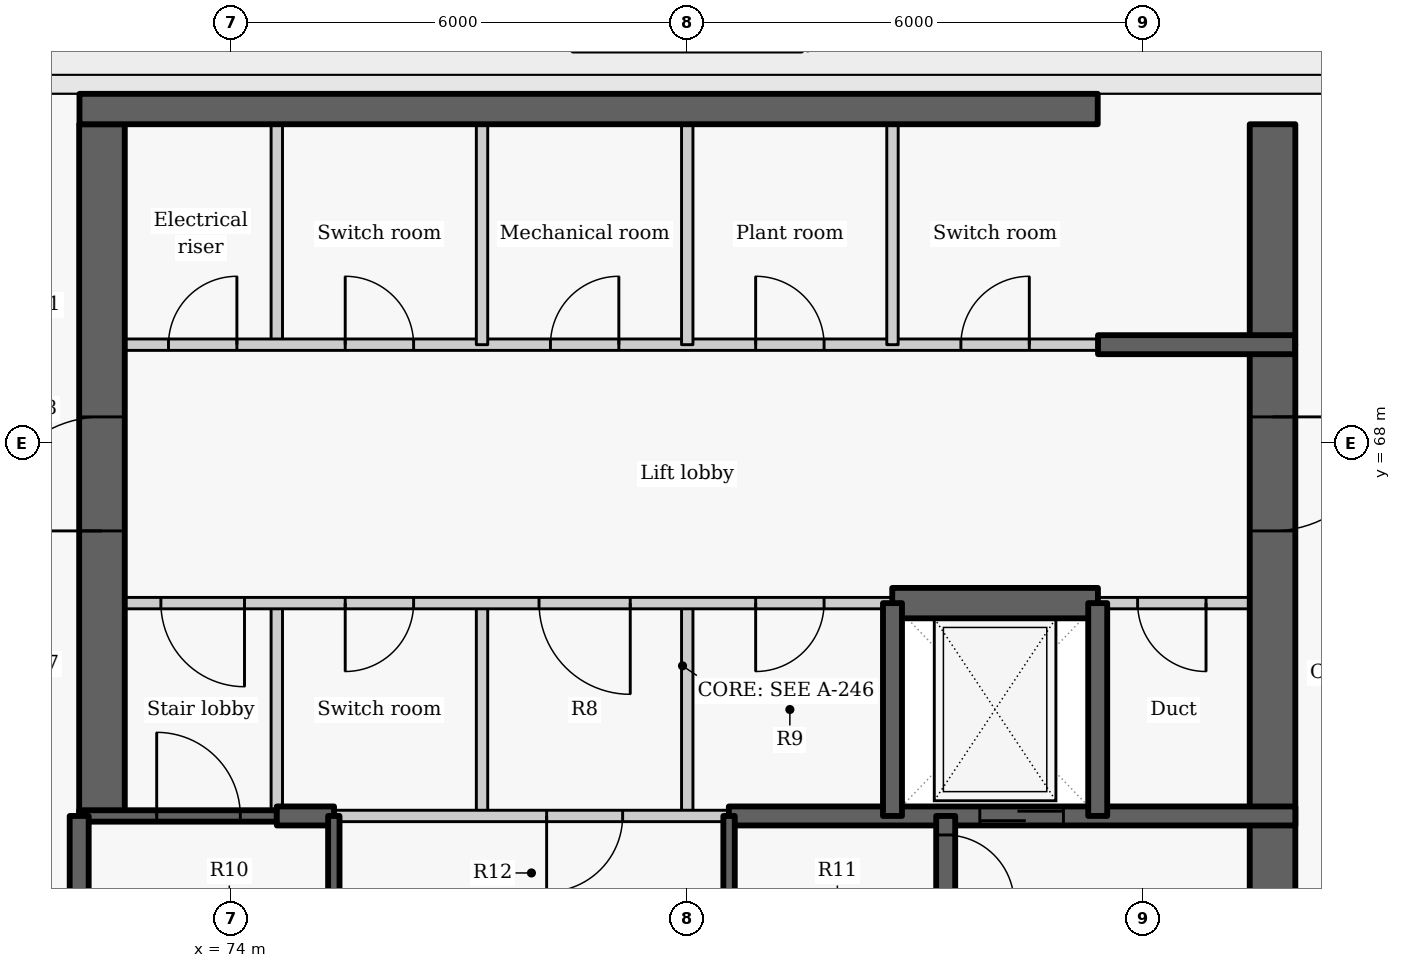
"""IFC4 building model, lengths in metres.
Left out: names, types, materials, properties, quantities, classifications, styles, units other than length and angle.
Written with IfcOpenShell. Run it as: python <this file> out.ifc"""

import sys

from ifc_helpers import new_model, si_unit, direction, frame, frame_2d, origin, place, context, subcontext, project, spatial, rectangle, extrude, element, fill, save


model = new_model("IFC4")
c1 = context("Model", 3, precision=1e-05, world=origin(), true_north=direction((0.0, 1.0)))
c2 = subcontext(c1, "Body", "Model", "MODEL_VIEW")
j1 = project(units=[si_unit("LENGTHUNIT", "METRE"), si_unit("PLANEANGLEUNIT", "RADIAN")], contexts=[c1])
p1 = place(None, origin())
s1 = spatial("IfcSite", under=j1, at=p1, CompositionType="ELEMENT")
p2 = place(p1, origin())
s2 = spatial("IfcBuilding", under=s1, at=p2, CompositionType="ELEMENT")
p3 = place(p2, frame((0.0, 0.0, 276.0)))
s3 = spatial("IfcBuildingStorey", under=s2, at=p3, CompositionType="ELEMENT", Elevation=276.0)
p4 = place(p3, frame((74.6, 63.1, 0.0), z_axis=(0.0, 0.0, 1.0), x_axis=(0.0, 1.0, 0.0)))
e1 = element("IfcWall", 1, at=p4, inside=s3, PredefinedType="PARTITIONING", context=c2, shape_type="SweptSolid", body=[
    extrude(rectangle(XDim=2.8, YDim=0.15, at=frame_2d((1.4, 0.0))), origin(), (0.0, 0.0, 1.0), 3.325),
])
p5 = place(p3, frame((74.6, 69.3, 0.0), z_axis=(0.0, 0.0, 1.0), x_axis=(0.0, 1.0, 0.0)))
e2 = element("IfcWall", 2, at=p5, inside=s3, PredefinedType="PARTITIONING", context=c2, shape_type="SweptSolid", body=[
    extrude(rectangle(XDim=2.9, YDim=0.15, at=frame_2d((1.45, 0.0))), origin(), (0.0, 0.0, 1.0), 3.325),
])
p6 = place(p3, frame((72.0, 69.3, 0.0), z_axis=(0.0, 0.0, 1.0), x_axis=(1.0, 0.0, 0.0)))
e3 = element("IfcWall", 3, at=p6, inside=s3, PredefinedType="PARTITIONING", context=c2, shape_type="SweptSolid", body=[
    extrude(rectangle(XDim=13.4, YDim=0.15, at=frame_2d((6.7, 0.0))), origin(), (0.0, 0.0, 1.0), 3.325),
])
p7 = place(p6, frame((1.175, 0.0, 0.0)))
e4 = element("IfcOpeningElement", 4, at=p7, cuts=e3, PredefinedType="OPENING", context=c2, shape_type="SweptSolid", body=[
    extrude(rectangle(XDim=0.9, YDim=2.1, at=frame_2d((0.45, 1.05))), frame((0.0, 0.085, 0.0), z_axis=(0.0, -1.0, 0.0), x_axis=(1.0, 0.0, 0.0)), (0.0, 0.0, 1.0), 0.17),
])
p8 = place(p6, frame((3.5, 0.0, 0.0)))
e5 = element("IfcOpeningElement", 5, at=p8, cuts=e3, PredefinedType="OPENING", context=c2, shape_type="SweptSolid", body=[
    extrude(rectangle(XDim=0.9, YDim=2.1, at=frame_2d((0.45, 1.05))), frame((0.0, 0.085, 0.0), z_axis=(0.0, -1.0, 0.0), x_axis=(1.0, 0.0, 0.0)), (0.0, 0.0, 1.0), 0.17),
])
p9 = place(p6, frame((6.2, 0.0, 0.0)))
e6 = element("IfcOpeningElement", 6, at=p9, cuts=e3, PredefinedType="OPENING", context=c2, shape_type="SweptSolid", body=[
    extrude(rectangle(XDim=0.9, YDim=2.1, at=frame_2d((0.45, 1.05))), frame((0.0, 0.085, 0.0), z_axis=(0.0, -1.0, 0.0), x_axis=(1.0, 0.0, 0.0)), (0.0, 0.0, 1.0), 0.17),
])
p10 = place(p6, frame((8.9, 0.0, 0.0)))
e7 = element("IfcOpeningElement", 7, at=p10, cuts=e3, PredefinedType="OPENING", context=c2, shape_type="SweptSolid", body=[
    extrude(rectangle(XDim=0.9, YDim=2.1, at=frame_2d((0.45, 1.05))), frame((0.0, 0.085, 0.0), z_axis=(0.0, -1.0, 0.0), x_axis=(1.0, 0.0, 0.0)), (0.0, 0.0, 1.0), 0.17),
])
p11 = place(p6, frame((11.6, 0.0, 0.0)))
e8 = element("IfcOpeningElement", 8, at=p11, cuts=e3, PredefinedType="OPENING", context=c2, shape_type="SweptSolid", body=[
    extrude(rectangle(XDim=0.9, YDim=2.1, at=frame_2d((0.45, 1.05))), frame((0.0, 0.085, 0.0), z_axis=(0.0, -1.0, 0.0), x_axis=(1.0, 0.0, 0.0)), (0.0, 0.0, 1.0), 0.17),
])
p12 = place(p3, frame((72.3, 63.1, -0.275), z_axis=(0.0, 0.0, 1.0), x_axis=(0.0, 1.0, 0.0)))
e9 = element("IfcWall", 9, at=p12, inside=s3, PredefinedType="SHEAR", context=c2, shape_type="SweptSolid", body=[
    extrude(rectangle(XDim=9.1, YDim=0.6, at=frame_2d((4.55, 0.0))), origin(), (0.0, 0.0, 1.0), 3.6),
])
p13 = place(p12, frame((3.75, 0.0, 0.275)))
e10 = element("IfcOpeningElement", 10, at=p13, cuts=e9, PredefinedType="OPENING", context=c2, shape_type="SweptSolid", body=[
    extrude(rectangle(XDim=1.5, YDim=2.1, at=frame_2d((0.75, 1.05))), frame((0.0, 0.31, 0.0), z_axis=(0.0, -1.0, 0.0), x_axis=(1.0, 0.0, 0.0)), (0.0, 0.0, 1.0), 0.62),
])
p14 = place(p3, frame((77.3, 63.1, 0.0), z_axis=(0.0, 0.0, 1.0), x_axis=(0.0, 1.0, 0.0)))
e11 = element("IfcWall", 11, at=p14, inside=s3, PredefinedType="PARTITIONING", context=c2, shape_type="SweptSolid", body=[
    extrude(rectangle(XDim=2.8, YDim=0.15, at=frame_2d((1.4, 0.0))), origin(), (0.0, 0.0, 1.0), 3.325),
])
p15 = place(p3, frame((77.3, 69.3, 0.0), z_axis=(0.0, 0.0, 1.0), x_axis=(0.0, 1.0, 0.0)))
e12 = element("IfcWall", 12, at=p15, inside=s3, PredefinedType="PARTITIONING", context=c2, shape_type="SweptSolid", body=[
    extrude(rectangle(XDim=2.9, YDim=0.15, at=frame_2d((1.45, 0.0))), origin(), (0.0, 0.0, 1.0), 3.325),
])
p16 = place(p3, frame((80.0, 63.1, 0.0), z_axis=(0.0, 0.0, 1.0), x_axis=(0.0, 1.0, 0.0)))
e13 = element("IfcWall", 13, at=p16, inside=s3, PredefinedType="PARTITIONING", context=c2, shape_type="SweptSolid", body=[
    extrude(rectangle(XDim=2.8, YDim=0.15, at=frame_2d((1.4, 0.0))), origin(), (0.0, 0.0, 1.0), 3.325),
])
for number, where, z_axis, x_axis in (
    (14, (80.0, 69.3, 0.0), (0.0, 0.0, 1.0), (0.0, 1.0, 0.0)),
    (15, (82.7, 69.3, 0.0), (0.0, 0.0, 1.0), (0.0, 1.0, 0.0)),
):
    element("IfcWall", number, at=place(p3, frame(where, z_axis=z_axis, x_axis=x_axis)), inside=s3, PredefinedType="PARTITIONING", context=c2, shape_type="SweptSolid", body=[
        extrude(rectangle(XDim=2.9, YDim=0.15, at=frame_2d((1.45, 0.0))), origin(), (0.0, 0.0, 1.0), 3.325),
    ])
p17 = place(p3, frame((82.703, 65.9, 0.0), z_axis=(0.0, 0.0, 1.0), x_axis=(-1.0, 0.0, 0.0)))
e16 = element("IfcWall", 16, at=p17, inside=s3, PredefinedType="PARTITIONING", context=c2, shape_type="SweptSolid", body=[
    extrude(rectangle(XDim=10.703, YDim=0.15, at=frame_2d((5.352, 0.0))), origin(), (0.0, 0.0, 1.0), 3.325),
])
p18 = place(p17, frame((8.528, 0.0, 0.0)))
e17 = element("IfcOpeningElement", 17, at=p18, cuts=e16, PredefinedType="OPENING", context=c2, shape_type="SweptSolid", body=[
    extrude(rectangle(XDim=1.1, YDim=2.1, at=frame_2d((0.55, 1.05))), frame((0.0, 0.085, 0.0), z_axis=(0.0, -1.0, 0.0), x_axis=(1.0, 0.0, 0.0)), (0.0, 0.0, 1.0), 0.17),
])
p19 = place(p17, frame((6.303, 0.0, 0.0)))
e18 = element("IfcOpeningElement", 18, at=p19, cuts=e16, PredefinedType="OPENING", context=c2, shape_type="SweptSolid", body=[
    extrude(rectangle(XDim=0.9, YDim=2.1, at=frame_2d((0.45, 1.05))), frame((0.0, 0.085, 0.0), z_axis=(0.0, -1.0, 0.0), x_axis=(1.0, 0.0, 0.0)), (0.0, 0.0, 1.0), 0.17),
])
p20 = place(p17, frame((3.453, 0.0, 0.0)))
e19 = element("IfcOpeningElement", 19, at=p20, cuts=e16, PredefinedType="OPENING", context=c2, shape_type="SweptSolid", body=[
    extrude(rectangle(XDim=1.2, YDim=2.1, at=frame_2d((0.6, 1.05))), frame((0.0, 0.085, 0.0), z_axis=(0.0, -1.0, 0.0), x_axis=(1.0, 0.0, 0.0)), (0.0, 0.0, 1.0), 0.17),
])
p21 = place(p17, frame((0.903, 0.0, 0.0)))
e20 = element("IfcOpeningElement", 20, at=p21, cuts=e16, PredefinedType="OPENING", context=c2, shape_type="SweptSolid", body=[
    extrude(rectangle(XDim=0.9, YDim=2.1, at=frame_2d((0.45, 1.05))), frame((0.0, 0.085, 0.0), z_axis=(0.0, -1.0, 0.0), x_axis=(1.0, 0.0, 0.0)), (0.0, 0.0, 1.0), 0.17),
])
p22 = place(p3, frame((88.0, 65.9, 0.0), z_axis=(0.0, 0.0, 1.0), x_axis=(-1.0, 0.0, 0.0)))
e21 = element("IfcWall", 21, at=p22, inside=s3, PredefinedType="PARTITIONING", context=c2, shape_type="SweptSolid", body=[
    extrude(rectangle(XDim=2.603, YDim=0.15, at=frame_2d((1.302, 0.0))), origin(), (0.0, 0.0, 1.0), 3.325),
])
p23 = place(p22, frame((1.175, 0.0, 0.0)))
e22 = element("IfcOpeningElement", 22, at=p23, cuts=e21, PredefinedType="OPENING", context=c2, shape_type="SweptSolid", body=[
    extrude(rectangle(XDim=0.9, YDim=2.1, at=frame_2d((0.45, 1.05))), frame((0.0, 0.085, 0.0), z_axis=(0.0, -1.0, 0.0), x_axis=(1.0, 0.0, 0.0)), (0.0, 0.0, 1.0), 0.17),
])
p24 = place(p3, frame((82.697, 65.9, -0.275), z_axis=(0.0, 0.0, 1.0), x_axis=(1.0, 0.0, 0.0)))
e23 = element("IfcWall", 23, at=p24, inside=s3, PredefinedType="SHEAR", context=c2, shape_type="SweptSolid", body=[
    extrude(rectangle(XDim=2.706, YDim=0.4, at=frame_2d((1.353, 0.0))), origin(), (0.0, 0.0, 1.0), 3.6),
])
p25 = place(p3, frame((87.7, 69.3, -0.275), z_axis=(0.0, 0.0, 1.0), x_axis=(0.0, -1.0, 0.0)))
e24 = element("IfcWall", 24, at=p25, inside=s3, PredefinedType="SHEAR", context=c2, shape_type="SweptSolid", body=[
    extrude(rectangle(XDim=11.35, YDim=0.6, at=frame_2d((5.675, 0.0))), origin(), (0.0, 0.0, 1.0), 3.6),
])
p26 = place(p25, frame((0.95, 0.0, 0.275)))
e25 = element("IfcOpeningElement", 25, at=p26, cuts=e24, PredefinedType="OPENING", context=c2, shape_type="SweptSolid", body=[
    extrude(rectangle(XDim=1.5, YDim=2.1, at=frame_2d((0.75, 1.05))), frame((0.0, 0.31, 0.0), z_axis=(0.0, -1.0, 0.0), x_axis=(1.0, 0.0, 0.0)), (0.0, 0.0, 1.0), 0.62),
])
p27 = place(p25, frame((8.225, 0.0, 0.275)))
e26 = element("IfcOpeningElement", 26, at=p27, cuts=e24, PredefinedType="OPENING", context=c2, shape_type="SweptSolid", body=[
    extrude(rectangle(XDim=1.1, YDim=2.1, at=frame_2d((0.55, 1.05))), frame((0.0, 0.31, 0.0), z_axis=(0.0, -1.0, 0.0), x_axis=(1.0, 0.0, 0.0)), (0.0, 0.0, 1.0), 0.62),
])
p28 = place(p3, frame((72.0, 63.1, -0.275), z_axis=(0.0, 0.0, 1.0), x_axis=(1.0, 0.0, 0.0)))
e27 = element("IfcWall", 27, at=p28, inside=s3, PredefinedType="SHEAR", context=c2, shape_type="SweptSolid", body=[
    extrude(rectangle(XDim=2.6, YDim=0.15, at=frame_2d((1.3, 0.0))), origin(), (0.0, 0.0, 1.0), 3.6),
])
p29 = place(p28, frame((1.02, 0.0, 0.275)))
e28 = element("IfcOpeningElement", 28, at=p29, cuts=e27, PredefinedType="OPENING", context=c2, shape_type="SweptSolid", body=[
    extrude(rectangle(XDim=1.1, YDim=2.1, at=frame_2d((0.55, 1.05))), frame((0.0, 0.085, 0.0), z_axis=(0.0, -1.0, 0.0), x_axis=(1.0, 0.0, 0.0)), (0.0, 0.0, 1.0), 0.17),
])
p30 = place(p3, frame((74.6, 63.1, -0.275), z_axis=(0.0, 0.0, 1.0), x_axis=(1.0, 0.0, 0.0)))
e29 = element("IfcWall", 29, at=p30, inside=s3, PredefinedType="SHEAR", context=c2, shape_type="SweptSolid", body=[
    extrude(rectangle(XDim=0.753, YDim=0.25, at=frame_2d((0.376, 0.0))), origin(), (0.0, 0.0, 1.0), 3.6),
])
p31 = place(p3, frame((80.547, 63.1, -0.275), z_axis=(0.0, 0.0, 1.0), x_axis=(1.0, 0.0, 0.0)))
e30 = element("IfcWall", 30, at=p31, inside=s3, PredefinedType="SHEAR", context=c2, shape_type="SweptSolid", body=[
    extrude(rectangle(XDim=7.453, YDim=0.25, at=frame_2d((3.727, 0.0))), origin(), (0.0, 0.0, 1.0), 3.6),
])
p32 = place(p31, frame((3.302, 0.0, 0.275)))
e31 = element("IfcOpeningElement", 31, at=p32, cuts=e30, PredefinedType="OPENING", context=c2, shape_type="SweptSolid", body=[
    extrude(rectangle(XDim=1.1, YDim=2.1, at=frame_2d((0.55, 1.05))), frame((0.0, 0.135, 0.0), z_axis=(0.0, -1.0, 0.0), x_axis=(1.0, 0.0, 0.0)), (0.0, 0.0, 1.0), 0.27),
])
p33 = place(p3, frame((80.553, 63.1, 0.0), z_axis=(0.0, 0.0, 1.0), x_axis=(-1.0, 0.0, 0.0)))
e32 = element("IfcWall", 32, at=p33, inside=s3, PredefinedType="PARTITIONING", context=c2, shape_type="SweptSolid", body=[
    extrude(rectangle(XDim=5.206, YDim=0.15, at=frame_2d((2.603, 0.0))), origin(), (0.0, 0.0, 1.0), 3.325),
])
p34 = place(p33, frame((1.403, 0.0, 0.0)))
e33 = element("IfcOpeningElement", 33, at=p34, cuts=e32, PredefinedType="OPENING", context=c2, shape_type="SweptSolid", body=[
    extrude(rectangle(XDim=1.0, YDim=2.1, at=frame_2d((0.5, 1.05))), frame((0.0, 0.085, 0.0), z_axis=(0.0, -1.0, 0.0), x_axis=(1.0, 0.0, 0.0)), (0.0, 0.0, 1.0), 0.17),
])
for number, where, z_axis, x_axis in (
    (34, (82.7, 63.1, -0.275), (0.0, 0.0, 1.0), (0.0, 1.0, 0.0)),
    (35, (85.4, 63.1, -0.275), (0.0, 0.0, 1.0), (0.0, 1.0, 0.0)),
):
    element("IfcWall", number, at=place(p3, frame(where, z_axis=z_axis, x_axis=x_axis)), inside=s3, PredefinedType="SHEAR", context=c2, shape_type="SweptSolid", body=[
        extrude(rectangle(XDim=2.8, YDim=0.25, at=frame_2d((1.4, 0.0))), origin(), (0.0, 0.0, 1.0), 3.6),
    ])
p35 = place(p3, frame((75.35, 61.597, -0.275), z_axis=(0.0, 0.0, 1.0), x_axis=(0.0, 1.0, 0.0)))
e36 = element("IfcWall", 36, at=p35, inside=s3, PredefinedType="SHEAR", context=c2, shape_type="SweptSolid", body=[
    extrude(rectangle(XDim=1.503, YDim=0.15, at=frame_2d((0.751, 0.0))), origin(), (0.0, 0.0, 1.0), 3.6),
])
p36 = place(p3, frame((72.0, 57.95, -0.275), z_axis=(0.0, 0.0, 1.0), x_axis=(0.0, 1.0, 0.0)))
e37 = element("IfcWall", 37, at=p36, inside=s3, PredefinedType="SHEAR", context=c2, shape_type="SweptSolid", body=[
    extrude(rectangle(XDim=5.15, YDim=0.25, at=frame_2d((2.575, 0.0))), origin(), (0.0, 0.0, 1.0), 3.6),
])
p37 = place(p3, frame((83.4, 63.1, -0.275), z_axis=(0.0, 0.0, 1.0), x_axis=(0.0, -1.0, 0.0)))
e38 = element("IfcWall", 38, at=p37, inside=s3, PredefinedType="SHEAR", context=c2, shape_type="SweptSolid", body=[
    extrude(rectangle(XDim=5.15, YDim=0.25, at=frame_2d((2.575, 0.0))), origin(), (0.0, 0.0, 1.0), 3.6),
])
p38 = place(p37, frame((0.25, 0.0, 0.275)))
e39 = element("IfcOpeningElement", 39, at=p38, cuts=e38, PredefinedType="OPENING", context=c2, shape_type="SweptSolid", body=[
    extrude(rectangle(XDim=0.9, YDim=2.1, at=frame_2d((0.45, 1.05))), frame((0.0, 0.135, 0.0), z_axis=(0.0, -1.0, 0.0), x_axis=(1.0, 0.0, 0.0)), (0.0, 0.0, 1.0), 0.27),
])
p39 = place(p3, frame((80.55, 61.597, -0.275), z_axis=(0.0, 0.0, 1.0), x_axis=(0.0, 1.0, 0.0)))
e40 = element("IfcWall", 40, at=p39, inside=s3, PredefinedType="SHEAR", context=c2, shape_type="SweptSolid", body=[
    extrude(rectangle(XDim=1.503, YDim=0.15, at=frame_2d((0.751, 0.0))), origin(), (0.0, 0.0, 1.0), 3.6),
])
p40 = place(p3, frame((72.004, 72.4, -0.275), z_axis=(0.0, 0.0, 1.0), x_axis=(1.0, 0.0, 0.0)))
e41 = element("IfcWall", 41, at=p40, inside=s3, PredefinedType="SHEAR", context=c2, shape_type="SweptSolid", body=[
    extrude(rectangle(XDim=13.396, YDim=0.4, at=frame_2d((6.698, 0.0))), origin(), (0.0, 0.0, 1.0), 3.6),
])
p41 = place(p3, frame((87.7, 69.304, -0.275), z_axis=(0.0, 0.0, 1.0), x_axis=(0.0, 1.0, 0.0)))
e42 = element("IfcWall", 42, at=p41, inside=s3, PredefinedType="SHEAR", context=c2, shape_type="SweptSolid", body=[
    extrude(rectangle(XDim=2.896, YDim=0.6, at=frame_2d((1.448, 0.0))), origin(), (0.0, 0.0, 1.0), 3.6),
])
p42 = place(p3, frame((85.404, 69.3, -0.275), z_axis=(0.0, 0.0, 1.0), x_axis=(1.0, 0.0, 0.0)))
e43 = element("IfcWall", 43, at=p42, inside=s3, PredefinedType="SHEAR", context=c2, shape_type="SweptSolid", body=[
    extrude(rectangle(XDim=2.592, YDim=0.25, at=frame_2d((1.296, 0.0))), origin(), (0.0, 0.0, 1.0), 3.6),
])
p43 = place(p7, origin())
e44 = element("IfcDoor", 44, at=p43, inside=s3, OperationType="SINGLE_SWING_RIGHT", PredefinedType="DOOR", context=c2, shape_type="SweptSolid", body=[
    extrude(rectangle(XDim=0.9, YDim=2.1, at=frame_2d((0.45, 1.05))), frame((0.0, 0.025, 0.0), z_axis=(0.0, -1.0, 0.0), x_axis=(1.0, 0.0, 0.0)), (0.0, 0.0, 1.0), 0.05),
])
fill(e4, e44)
p44 = place(p8, origin())
e45 = element("IfcDoor", 45, at=p44, inside=s3, OperationType="SINGLE_SWING_LEFT", PredefinedType="DOOR", context=c2, shape_type="SweptSolid", body=[
    extrude(rectangle(XDim=0.9, YDim=2.1, at=frame_2d((0.45, 1.05))), frame((0.0, 0.025, 0.0), z_axis=(0.0, -1.0, 0.0), x_axis=(1.0, 0.0, 0.0)), (0.0, 0.0, 1.0), 0.05),
])
fill(e5, e45)
p45 = place(p9, origin())
e46 = element("IfcDoor", 46, at=p45, inside=s3, OperationType="SINGLE_SWING_RIGHT", PredefinedType="DOOR", context=c2, shape_type="SweptSolid", body=[
    extrude(rectangle(XDim=0.9, YDim=2.1, at=frame_2d((0.45, 1.05))), frame((0.0, 0.025, 0.0), z_axis=(0.0, -1.0, 0.0), x_axis=(1.0, 0.0, 0.0)), (0.0, 0.0, 1.0), 0.05),
])
fill(e6, e46)
p46 = place(p10, origin())
e47 = element("IfcDoor", 47, at=p46, inside=s3, OperationType="SINGLE_SWING_LEFT", PredefinedType="DOOR", context=c2, shape_type="SweptSolid", body=[
    extrude(rectangle(XDim=0.9, YDim=2.1, at=frame_2d((0.45, 1.05))), frame((0.0, 0.025, 0.0), z_axis=(0.0, -1.0, 0.0), x_axis=(1.0, 0.0, 0.0)), (0.0, 0.0, 1.0), 0.05),
])
fill(e7, e47)
p47 = place(p11, origin())
e48 = element("IfcDoor", 48, at=p47, inside=s3, OperationType="SINGLE_SWING_RIGHT", PredefinedType="DOOR", context=c2, shape_type="SweptSolid", body=[
    extrude(rectangle(XDim=0.9, YDim=2.1, at=frame_2d((0.45, 1.05))), frame((0.0, 0.025, 0.0), z_axis=(0.0, -1.0, 0.0), x_axis=(1.0, 0.0, 0.0)), (0.0, 0.0, 1.0), 0.05),
])
fill(e8, e48)
p48 = place(p18, origin())
e49 = element("IfcDoor", 49, at=p48, inside=s3, OperationType="SINGLE_SWING_LEFT", PredefinedType="DOOR", context=c2, shape_type="SweptSolid", body=[
    extrude(rectangle(XDim=1.1, YDim=2.1, at=frame_2d((0.55, 1.05))), frame((0.0, 0.025, 0.0), z_axis=(0.0, -1.0, 0.0), x_axis=(1.0, 0.0, 0.0)), (0.0, 0.0, 1.0), 0.05),
])
fill(e17, e49)
p49 = place(p19, origin())
e50 = element("IfcDoor", 50, at=p49, inside=s3, OperationType="SINGLE_SWING_RIGHT", PredefinedType="DOOR", context=c2, shape_type="SweptSolid", body=[
    extrude(rectangle(XDim=0.9, YDim=2.1, at=frame_2d((0.45, 1.05))), frame((0.0, 0.025, 0.0), z_axis=(0.0, -1.0, 0.0), x_axis=(1.0, 0.0, 0.0)), (0.0, 0.0, 1.0), 0.05),
])
fill(e18, e50)
p50 = place(p20, origin())
e51 = element("IfcDoor", 51, at=p50, inside=s3, OperationType="DOUBLE_DOOR_SINGLE_SWING", PredefinedType="DOOR", context=c2, shape_type="SweptSolid", body=[
    extrude(rectangle(XDim=1.2, YDim=2.1, at=frame_2d((0.6, 1.05))), frame((0.0, 0.025, 0.0), z_axis=(0.0, -1.0, 0.0), x_axis=(1.0, 0.0, 0.0)), (0.0, 0.0, 1.0), 0.05),
])
fill(e19, e51)
p51 = place(p21, origin())
e52 = element("IfcDoor", 52, at=p51, inside=s3, OperationType="SINGLE_SWING_RIGHT", PredefinedType="DOOR", context=c2, shape_type="SweptSolid", body=[
    extrude(rectangle(XDim=0.9, YDim=2.1, at=frame_2d((0.45, 1.05))), frame((0.0, 0.025, 0.0), z_axis=(0.0, -1.0, 0.0), x_axis=(1.0, 0.0, 0.0)), (0.0, 0.0, 1.0), 0.05),
])
fill(e20, e52)
p52 = place(p32, origin())
e53 = element("IfcDoor", 53, at=p52, inside=s3, OperationType="SLIDING_TO_LEFT", PredefinedType="DOOR", context=c2, shape_type="SweptSolid", body=[
    extrude(rectangle(XDim=1.1, YDim=2.1, at=frame_2d((0.55, 1.05))), frame((0.0, 0.025, 0.0), z_axis=(0.0, -1.0, 0.0), x_axis=(1.0, 0.0, 0.0)), (0.0, 0.0, 1.0), 0.05),
])
fill(e31, e53)
p53 = place(p23, origin())
e54 = element("IfcDoor", 54, at=p53, inside=s3, OperationType="SINGLE_SWING_LEFT", PredefinedType="DOOR", context=c2, shape_type="SweptSolid", body=[
    extrude(rectangle(XDim=0.9, YDim=2.1, at=frame_2d((0.45, 1.05))), frame((0.0, 0.025, 0.0), z_axis=(0.0, -1.0, 0.0), x_axis=(1.0, 0.0, 0.0)), (0.0, 0.0, 1.0), 0.05),
])
fill(e22, e54)
p54 = place(p34, origin())
e55 = element("IfcDoor", 55, at=p54, inside=s3, OperationType="SINGLE_SWING_RIGHT", PredefinedType="DOOR", context=c2, shape_type="SweptSolid", body=[
    extrude(rectangle(XDim=1.0, YDim=2.1, at=frame_2d((0.5, 1.05))), frame((0.0, 0.025, 0.0), z_axis=(0.0, -1.0, 0.0), x_axis=(1.0, 0.0, 0.0)), (0.0, 0.0, 1.0), 0.05),
])
fill(e33, e55)
p55 = place(p29, origin())
e56 = element("IfcDoor", 56, at=p55, inside=s3, OperationType="SINGLE_SWING_LEFT", PredefinedType="DOOR", context=c2, shape_type="SweptSolid", body=[
    extrude(rectangle(XDim=1.1, YDim=2.1, at=frame_2d((0.55, 1.05))), frame((0.0, 0.025, 0.0), z_axis=(0.0, -1.0, 0.0), x_axis=(1.0, 0.0, 0.0)), (0.0, 0.0, 1.0), 0.05),
])
fill(e28, e56)
p56 = place(p38, origin())
e57 = element("IfcDoor", 57, at=p56, inside=s3, OperationType="SINGLE_SWING_RIGHT", PredefinedType="DOOR", context=c2, shape_type="SweptSolid", body=[
    extrude(rectangle(XDim=0.9, YDim=2.1, at=frame_2d((0.45, 1.05))), frame((0.0, 0.025, 0.0), z_axis=(0.0, -1.0, 0.0), x_axis=(1.0, 0.0, 0.0)), (0.0, 0.0, 1.0), 0.05),
])
fill(e39, e57)
p57 = place(p26, origin())
e58 = element("IfcDoor", 58, at=p57, inside=s3, OperationType="DOUBLE_DOOR_SINGLE_SWING", PredefinedType="DOOR", context=c2, shape_type="SweptSolid", body=[
    extrude(rectangle(XDim=1.5, YDim=2.1, at=frame_2d((0.75, 1.05))), frame((0.0, 0.025, 0.0), z_axis=(0.0, -1.0, 0.0), x_axis=(1.0, 0.0, 0.0)), (0.0, 0.0, 1.0), 0.05),
])
fill(e25, e58)
p58 = place(p13, origin())
e59 = element("IfcDoor", 59, at=p58, inside=s3, OperationType="DOUBLE_DOOR_SINGLE_SWING", PredefinedType="DOOR", context=c2, shape_type="SweptSolid", body=[
    extrude(rectangle(XDim=1.5, YDim=2.1, at=frame_2d((0.75, 1.05))), frame((0.0, 0.025, 0.0), z_axis=(0.0, -1.0, 0.0), x_axis=(1.0, 0.0, 0.0)), (0.0, 0.0, 1.0), 0.05),
])
fill(e10, e59)
save(model, sys.argv[1])
